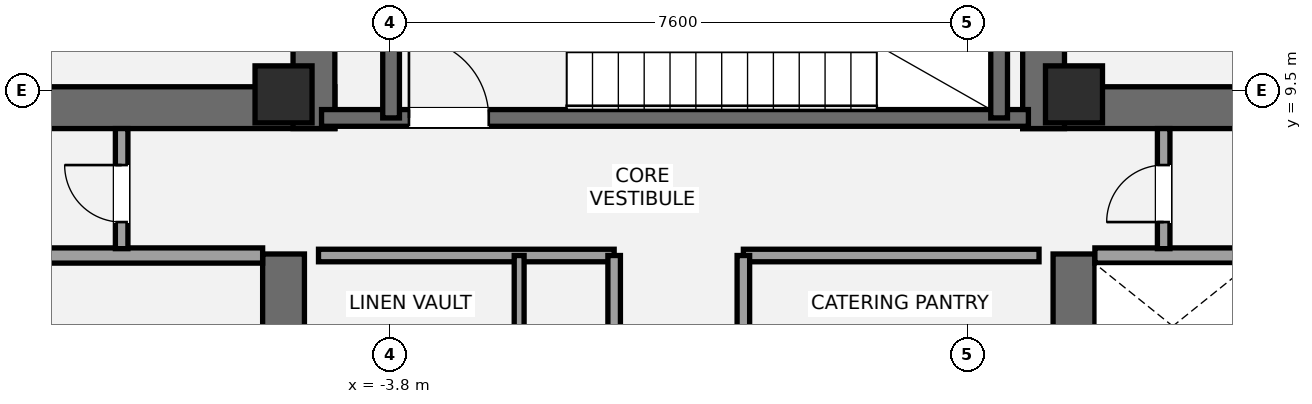
"""IFC4 building model, lengths in metres.
Left out: names, types, materials, properties, quantities, classifications, styles, units other than length and angle.
Written with IfcOpenShell. Run it as: python <this file> out.ifc"""

import sys

from ifc_helpers import new_model, si_unit, direction, frame, frame_2d, origin, origin_2d, place, context, subcontext, project, spatial, rectangle, extrude, element, fill, save


model = new_model("IFC4")
c1 = context("Model", 3, precision=1e-05, world=origin(), true_north=direction((0.0, 1.0)))
c2 = subcontext(c1, "Body", "Model", "MODEL_VIEW")
j1 = project(units=[si_unit("LENGTHUNIT", "METRE"), si_unit("PLANEANGLEUNIT", "RADIAN")], contexts=[c1])
p1 = place(None, origin())
s1 = spatial("IfcSite", under=j1, at=p1, CompositionType="ELEMENT")
p2 = place(p1, origin())
s2 = spatial("IfcBuilding", under=s1, at=p2, CompositionType="ELEMENT")
p3 = place(p2, frame((0.0, 0.0, 260.4)))
s3 = spatial("IfcBuildingStorey", under=s2, at=p3, CompositionType="ELEMENT", Elevation=260.4)
p4 = place(p3, frame((-13.7, 9.275, 0.0), z_axis=(0.0, 0.0, 1.0), x_axis=(1.0, 0.0, 0.0)))
e1 = element("IfcWall", 1, at=p4, inside=s3, PredefinedType="SHEAR", context=c2, shape_type="SweptSolid", body=[
    extrude(rectangle(XDim=9.175, YDim=0.55, at=frame_2d((4.587, 0.0))), origin(), (0.0, 0.0, 1.0), 4.4),
])
p5 = place(p3, frame((-5.2, 5.35, 0.0), z_axis=(0.0, 0.0, 1.0), x_axis=(0.0, 1.0, 0.0)))
e2 = element("IfcWall", 2, at=p5, inside=s3, PredefinedType="SHEAR", context=c2, shape_type="SweptSolid", body=[
    extrude(rectangle(XDim=2.0, YDim=0.55, at=frame_2d((1.0, 0.0))), origin(), (0.0, 0.0, 1.0), 4.4),
])
p6 = place(p3, frame((4.525, 9.275, 0.0), z_axis=(0.0, 0.0, 1.0), x_axis=(1.0, 0.0, 0.0)))
e3 = element("IfcWall", 3, at=p6, inside=s3, PredefinedType="SHEAR", context=c2, shape_type="SweptSolid", body=[
    extrude(rectangle(XDim=9.175, YDim=0.55, at=frame_2d((4.587, 0.0))), origin(), (0.0, 0.0, 1.0), 4.4),
])
p7 = place(p3, frame((5.2, 5.35, 0.0), z_axis=(0.0, 0.0, 1.0), x_axis=(0.0, 1.0, 0.0)))
e4 = element("IfcWall", 4, at=p7, inside=s3, PredefinedType="SHEAR", context=c2, shape_type="SweptSolid", body=[
    extrude(rectangle(XDim=2.0, YDim=0.55, at=frame_2d((1.0, 0.0))), origin(), (0.0, 0.0, 1.0), 4.4),
])
for number, where, z_axis, x_axis in (
    (5, (-4.8, 9.0, 0.0), (0.0, 0.0, 1.0), (0.0, 1.0, 0.0)),
    (6, (4.8, 9.0, 0.0), (0.0, 0.0, 1.0), (0.0, 1.0, 0.0)),
):
    element("IfcWall", number, at=place(p3, frame(where, z_axis=z_axis, x_axis=x_axis)), inside=s3, PredefinedType="SHEAR", context=c2, shape_type="SweptSolid", body=[
        extrude(rectangle(XDim=3.95, YDim=0.55, at=frame_2d((1.975, 0.0))), origin(), (0.0, 0.0, 1.0), 4.4),
    ])
p8 = place(p3, frame((-4.7, 9.14, 0.0), z_axis=(0.0, 0.0, 1.0), x_axis=(1.0, 0.0, 0.0)))
e7 = element("IfcWall", 7, at=p8, inside=s3, PredefinedType="SHEAR", context=c2, shape_type="SweptSolid", body=[
    extrude(rectangle(XDim=9.3, YDim=0.22, at=frame_2d((4.65, 0.0))), origin(), (0.0, 0.0, 1.0), 4.4),
])
p9 = place(p8, frame((1.15, 0.0, 0.0)))
e8 = element("IfcOpeningElement", 8, at=p9, cuts=e7, PredefinedType="OPENING", context=c2, shape_type="SweptSolid", body=[
    extrude(rectangle(XDim=1.05, YDim=2.15, at=frame_2d((0.525, 1.075))), frame((0.0, 0.12, 0.0), z_axis=(0.0, -1.0, 0.0), x_axis=(1.0, 0.0, 0.0)), (0.0, 0.0, 1.0), 0.24),
])
for number, where, z_axis, x_axis in (
    (9, (-3.785, 9.14, 0.0), (0.0, 0.0, 1.0), (0.0, 1.0, 0.0)),
    (10, (4.215, 9.14, 0.0), (0.0, 0.0, 1.0), (0.0, 1.0, 0.0)),
):
    element("IfcWall", number, at=place(p3, frame(where, z_axis=z_axis, x_axis=x_axis)), inside=s3, PredefinedType="SHEAR", context=c2, shape_type="SweptSolid", body=[
        extrude(rectangle(XDim=3.26, YDim=0.22, at=frame_2d((1.63, 0.0))), origin(), (0.0, 0.0, 1.0), 4.4),
    ])
for number, where, z_axis, x_axis in (
    (11, (-5.2, 9.45, 0.0), (0.0, 0.0, 1.0), (1.0, 0.0, 0.0)),
    (12, (5.2, 9.45, 0.0), (0.0, 0.0, 1.0), (1.0, 0.0, 0.0)),
):
    element("IfcColumn", number, at=place(p3, frame(where, z_axis=z_axis, x_axis=x_axis)), inside=s3, PredefinedType="PILASTER", context=c2, shape_type="SweptSolid", body=[
        extrude(rectangle(XDim=0.75, YDim=0.75, at=origin_2d()), origin(), (0.0, 0.0, 1.0), 4.4),
    ])
for number, where, z_axis, x_axis in (
    (13, (-9.78, 7.33, 0.0), (0.0, 0.0, 1.0), (1.0, 0.0, 0.0)),
    (14, (5.475, 7.33, 0.0), (0.0, 0.0, 1.0), (1.0, 0.0, 0.0)),
):
    element("IfcWall", number, at=place(p3, frame(where, z_axis=z_axis, x_axis=x_axis)), inside=s3, PredefinedType="SOLIDWALL", context=c2, shape_type="SweptSolid", body=[
        extrude(rectangle(XDim=4.305, YDim=0.2, at=frame_2d((2.152, 0.0))), origin(), (0.0, 0.0, 1.0), 4.18),
    ])
p10 = place(p3, frame((-4.74, 7.33, 0.0), z_axis=(0.0, 0.0, 1.0), x_axis=(1.0, 0.0, 0.0)))
e15 = element("IfcWall", 15, at=p10, inside=s3, PredefinedType="PARTITIONING", context=c2, shape_type="SweptSolid", body=[
    extrude(rectangle(XDim=3.89, YDim=0.165, at=frame_2d((1.945, 0.0))), origin(), (0.0, 0.0, 1.0), 4.18),
])
p11 = place(p3, frame((-0.85, 5.52, 0.0), z_axis=(0.0, 0.0, 1.0), x_axis=(0.0, 1.0, 0.0)))
e16 = element("IfcWall", 16, at=p11, inside=s3, PredefinedType="PARTITIONING", context=c2, shape_type="SweptSolid", body=[
    extrude(rectangle(XDim=1.81, YDim=0.165, at=frame_2d((0.905, 0.0))), origin(), (0.0, 0.0, 1.0), 4.18),
])
p12 = place(p3, frame((0.85, 7.33, 0.0), z_axis=(0.0, 0.0, 1.0), x_axis=(1.0, 0.0, 0.0)))
e17 = element("IfcWall", 17, at=p12, inside=s3, PredefinedType="PARTITIONING", context=c2, shape_type="SweptSolid", body=[
    extrude(rectangle(XDim=3.89, YDim=0.165, at=frame_2d((1.945, 0.0))), origin(), (0.0, 0.0, 1.0), 4.18),
])
p13 = place(p3, frame((0.85, 5.52, 0.0), z_axis=(0.0, 0.0, 1.0), x_axis=(0.0, 1.0, 0.0)))
e18 = element("IfcWall", 18, at=p13, inside=s3, PredefinedType="PARTITIONING", context=c2, shape_type="SweptSolid", body=[
    extrude(rectangle(XDim=1.81, YDim=0.165, at=frame_2d((0.905, 0.0))), origin(), (0.0, 0.0, 1.0), 4.18),
])
p14 = place(p3, frame((-2.1, 5.52, 0.0), z_axis=(0.0, 0.0, 1.0), x_axis=(0.0, 1.0, 0.0)))
e19 = element("IfcWall", 19, at=p14, inside=s3, PredefinedType="PARTITIONING", context=c2, shape_type="SweptSolid", body=[
    extrude(rectangle(XDim=1.81, YDim=0.13, at=frame_2d((0.905, 0.0))), origin(), (0.0, 0.0, 1.0), 4.18),
])
p15 = place(p3, frame((-7.33, 7.42, 0.0), z_axis=(0.0, 0.0, 1.0), x_axis=(0.0, 1.0, 0.0)))
e20 = element("IfcWall", 20, at=p15, inside=s3, PredefinedType="PARTITIONING", context=c2, shape_type="SweptSolid", body=[
    extrude(rectangle(XDim=1.58, YDim=0.165, at=frame_2d((0.79, 0.0))), origin(), (0.0, 0.0, 1.0), 4.18),
])
p16 = place(p15, frame((0.35, 0.0, 0.0)))
e21 = element("IfcOpeningElement", 21, at=p16, cuts=e20, PredefinedType="OPENING", context=c2, shape_type="SweptSolid", body=[
    extrude(rectangle(XDim=0.75, YDim=2.1, at=frame_2d((0.375, 1.05))), frame((0.0, 0.093, 0.0), z_axis=(0.0, -1.0, 0.0), x_axis=(1.0, 0.0, 0.0)), (0.0, 0.0, 1.0), 0.185),
])
p17 = place(p3, frame((6.38, 7.42, 0.0), z_axis=(0.0, 0.0, 1.0), x_axis=(0.0, 1.0, 0.0)))
e22 = element("IfcWall", 22, at=p17, inside=s3, PredefinedType="PARTITIONING", context=c2, shape_type="SweptSolid", body=[
    extrude(rectangle(XDim=1.58, YDim=0.165, at=frame_2d((0.79, 0.0))), origin(), (0.0, 0.0, 1.0), 4.18),
])
p18 = place(p17, frame((0.35, 0.0, 0.0)))
e23 = element("IfcOpeningElement", 23, at=p18, cuts=e22, PredefinedType="OPENING", context=c2, shape_type="SweptSolid", body=[
    extrude(rectangle(XDim=0.75, YDim=2.1, at=frame_2d((0.375, 1.05))), frame((0.0, 0.093, 0.0), z_axis=(0.0, -1.0, 0.0), x_axis=(1.0, 0.0, 0.0)), (0.0, 0.0, 1.0), 0.185),
])
p19 = place(p9, origin())
e24 = element("IfcDoor", 24, at=p19, inside=s3, OperationType="SINGLE_SWING_LEFT", PredefinedType="DOOR", context=c2, shape_type="SweptSolid", body=[
    extrude(rectangle(XDim=1.05, YDim=2.15, at=frame_2d((0.525, 1.075))), frame((0.0, 0.025, 0.0), z_axis=(0.0, -1.0, 0.0), x_axis=(1.0, 0.0, 0.0)), (0.0, 0.0, 1.0), 0.05),
])
fill(e8, e24)
p20 = place(p16, origin())
e25 = element("IfcDoor", 25, at=p20, inside=s3, OperationType="SINGLE_SWING_RIGHT", PredefinedType="DOOR", context=c2, shape_type="SweptSolid", body=[
    extrude(rectangle(XDim=0.75, YDim=2.1, at=frame_2d((0.375, 1.05))), frame((0.0, 0.025, 0.0), z_axis=(0.0, -1.0, 0.0), x_axis=(1.0, 0.0, 0.0)), (0.0, 0.0, 1.0), 0.05),
])
fill(e21, e25)
p21 = place(p18, origin())
e26 = element("IfcDoor", 26, at=p21, inside=s3, OperationType="SINGLE_SWING_LEFT", PredefinedType="DOOR", context=c2, shape_type="SweptSolid", body=[
    extrude(rectangle(XDim=0.75, YDim=2.1, at=frame_2d((0.375, 1.05))), frame((0.0, 0.025, 0.0), z_axis=(0.0, -1.0, 0.0), x_axis=(1.0, 0.0, 0.0)), (0.0, 0.0, 1.0), 0.05),
])
fill(e23, e26)
save(model, sys.argv[1])
